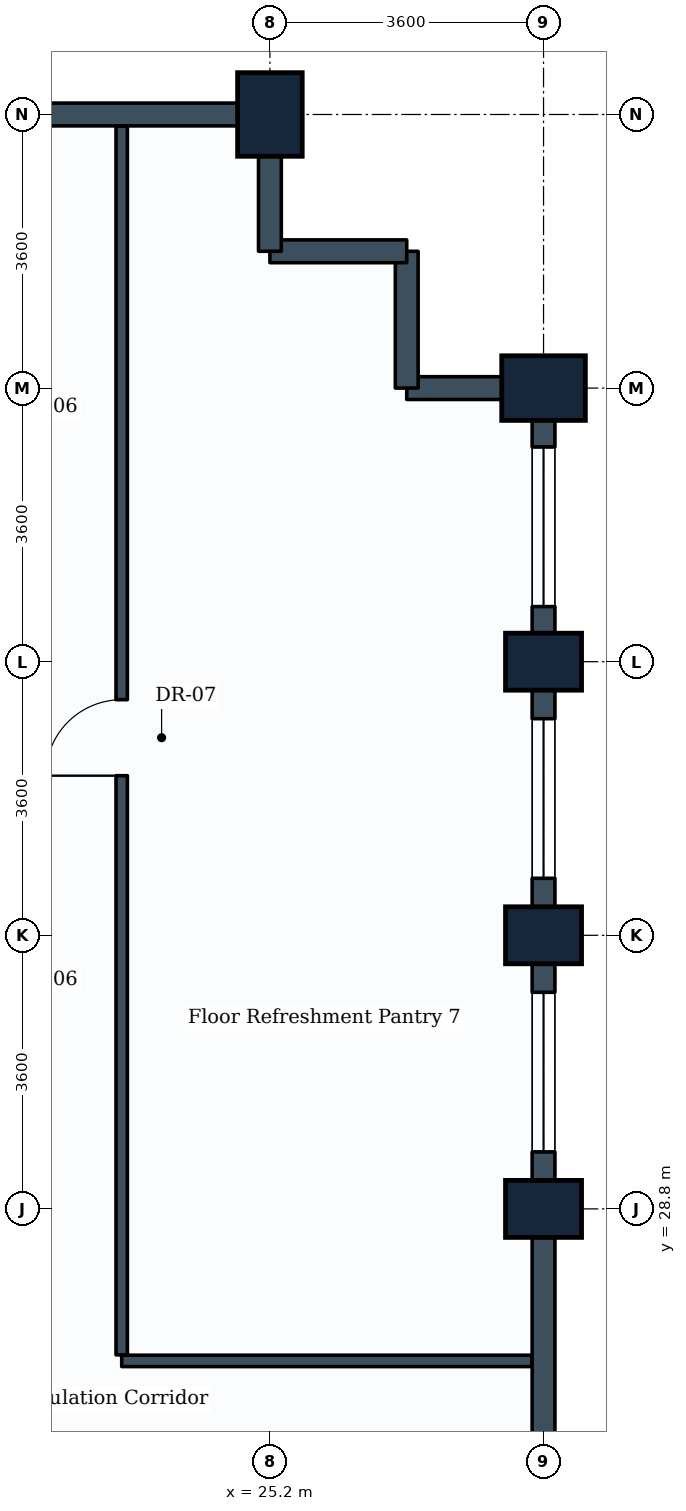
"""IFC4 building model, lengths in metres.
Left out: names, types, materials, properties, quantities, classifications, styles, units other than length and angle.
Written with IfcOpenShell. Run it as: python <this file> out.ifc"""

import sys

from ifc_helpers import new_model, si_unit, direction, frame, frame_2d, origin, origin_2d, place, context, subcontext, project, spatial, rectangle, extrude, element, fill, save


model = new_model("IFC4")
c1 = context("Model", 3, precision=1e-05, world=origin(), true_north=direction((0.0, 1.0)))
c2 = subcontext(c1, "Body", "Model", "MODEL_VIEW")
j1 = project(units=[si_unit("LENGTHUNIT", "METRE"), si_unit("PLANEANGLEUNIT", "RADIAN")], contexts=[c1])
p1 = place(None, origin())
s1 = spatial("IfcSite", under=j1, at=p1, CompositionType="ELEMENT")
p2 = place(p1, origin())
s2 = spatial("IfcBuilding", under=s1, at=p2, CompositionType="ELEMENT")
p3 = place(p2, frame((0.0, 0.0, 139.0)))
s3 = spatial("IfcBuildingStorey", under=s2, at=p3, CompositionType="ELEMENT", Elevation=139.0)
p4 = place(p3, frame((25.2, 43.2, 0.0), z_axis=(0.0, 0.0, 1.0), x_axis=(1.0, 0.0, 0.0)))
e1 = element("IfcColumn", 1, at=p4, inside=s3, PredefinedType="COLUMN", context=c2, shape_type="SweptSolid", body=[
    extrude(rectangle(XDim=0.85, YDim=1.1, at=origin_2d()), origin(), (0.0, 0.0, 1.0), 3.8),
])
for number, where, z_axis, x_axis in (
    (2, (28.8, 28.8, 0.0), (0.0, 0.0, 1.0), (0.0, 1.0, 0.0)),
    (3, (28.8, 32.4, 0.0), (0.0, 0.0, 1.0), (0.0, 1.0, 0.0)),
    (4, (28.8, 36.0, 0.0), (0.0, 0.0, 1.0), (0.0, 1.0, 0.0)),
):
    element("IfcColumn", number, at=place(p3, frame(where, z_axis=z_axis, x_axis=x_axis)), inside=s3, PredefinedType="COLUMN", context=c2, shape_type="SweptSolid", body=[
        extrude(rectangle(XDim=0.75, YDim=1.0, at=origin_2d()), origin(), (0.0, 0.0, 1.0), 3.8),
    ])
p5 = place(p3, frame((28.8, 39.6, 0.0), z_axis=(0.0, 0.0, 1.0), x_axis=(0.0, 1.0, 0.0)))
e5 = element("IfcColumn", 5, at=p5, inside=s3, PredefinedType="COLUMN", context=c2, shape_type="SweptSolid", body=[
    extrude(rectangle(XDim=0.85, YDim=1.1, at=origin_2d()), origin(), (0.0, 0.0, 1.0), 3.8),
])
p6 = place(p3, frame((28.8, 28.8, 0.0), z_axis=(0.0, 0.0, 1.0), x_axis=(0.0, -1.0, 0.0)))
e6 = element("IfcWall", 6, at=p6, inside=s3, PredefinedType="STANDARD", context=c2, shape_type="SweptSolid", body=[
    extrude(rectangle(XDim=3.6, YDim=0.3, at=frame_2d((1.8, 0.0))), origin(), (0.0, 0.0, 1.0), 3.17),
])
p7 = place(p3, frame((28.8, 32.4, 0.0), z_axis=(0.0, 0.0, 1.0), x_axis=(0.0, -1.0, 0.0)))
e7 = element("IfcWall", 7, at=p7, inside=s3, PredefinedType="STANDARD", context=c2, shape_type="SweptSolid", body=[
    extrude(rectangle(XDim=3.6, YDim=0.3, at=frame_2d((1.8, 0.0))), origin(), (0.0, 0.0, 1.0), 2.93),
])
p8 = place(p7, frame((0.75, 0.0, 0.85)))
e8 = element("IfcOpeningElement", 8, at=p8, cuts=e7, PredefinedType="OPENING", context=c2, shape_type="SweptSolid", body=[
    extrude(rectangle(XDim=2.1, YDim=1.35, at=frame_2d((1.05, 0.675))), frame((0.0, 0.16, 0.0), z_axis=(0.0, -1.0, 0.0), x_axis=(1.0, 0.0, 0.0)), (0.0, 0.0, 1.0), 0.32),
])
p9 = place(p3, frame((28.8, 36.0, 0.0), z_axis=(0.0, 0.0, 1.0), x_axis=(0.0, -1.0, 0.0)))
e9 = element("IfcWall", 9, at=p9, inside=s3, PredefinedType="STANDARD", context=c2, shape_type="SweptSolid", body=[
    extrude(rectangle(XDim=3.6, YDim=0.3, at=frame_2d((1.8, 0.0))), origin(), (0.0, 0.0, 1.0), 2.93),
])
p10 = place(p9, frame((0.75, 0.0, 0.85)))
e10 = element("IfcOpeningElement", 10, at=p10, cuts=e9, PredefinedType="OPENING", context=c2, shape_type="SweptSolid", body=[
    extrude(rectangle(XDim=2.1, YDim=1.35, at=frame_2d((1.05, 0.675))), frame((0.0, 0.16, 0.0), z_axis=(0.0, -1.0, 0.0), x_axis=(1.0, 0.0, 0.0)), (0.0, 0.0, 1.0), 0.32),
])
p11 = place(p3, frame((28.8, 39.6, 0.0), z_axis=(0.0, 0.0, 1.0), x_axis=(0.0, -1.0, 0.0)))
e11 = element("IfcWall", 11, at=p11, inside=s3, PredefinedType="STANDARD", context=c2, shape_type="SweptSolid", body=[
    extrude(rectangle(XDim=3.6, YDim=0.3, at=frame_2d((1.8, 0.0))), origin(), (0.0, 0.0, 1.0), 2.93),
])
p12 = place(p11, frame((0.775, 0.0, 0.85)))
e12 = element("IfcOpeningElement", 12, at=p12, cuts=e11, PredefinedType="OPENING", context=c2, shape_type="SweptSolid", body=[
    extrude(rectangle(XDim=2.1, YDim=1.35, at=frame_2d((1.05, 0.675))), frame((0.0, 0.16, 0.0), z_axis=(0.0, -1.0, 0.0), x_axis=(1.0, 0.0, 0.0)), (0.0, 0.0, 1.0), 0.32),
])
p13 = place(p3, frame((27.0, 39.6, 0.0), z_axis=(0.0, 0.0, 1.0), x_axis=(1.0, 0.0, 0.0)))
e13 = element("IfcWall", 13, at=p13, inside=s3, PredefinedType="STANDARD", context=c2, shape_type="SweptSolid", body=[
    extrude(rectangle(XDim=1.8, YDim=0.3, at=frame_2d((0.9, 0.0))), origin(), (0.0, 0.0, 1.0), 2.93),
])
p14 = place(p3, frame((27.0, 39.6, 0.0), z_axis=(0.0, 0.0, 1.0), x_axis=(0.0, 1.0, 0.0)))
e14 = element("IfcWall", 14, at=p14, inside=s3, PredefinedType="STANDARD", context=c2, shape_type="SweptSolid", body=[
    extrude(rectangle(XDim=1.8, YDim=0.3, at=frame_2d((0.9, 0.0))), origin(), (0.0, 0.0, 1.0), 3.535),
])
p15 = place(p3, frame((25.2, 41.4, 0.0), z_axis=(0.0, 0.0, 1.0), x_axis=(1.0, 0.0, 0.0)))
e15 = element("IfcWall", 15, at=p15, inside=s3, PredefinedType="STANDARD", context=c2, shape_type="SweptSolid", body=[
    extrude(rectangle(XDim=1.8, YDim=0.3, at=frame_2d((0.9, 0.0))), origin(), (0.0, 0.0, 1.0), 3.535),
])
p16 = place(p3, frame((25.2, 41.4, 0.0), z_axis=(0.0, 0.0, 1.0), x_axis=(0.0, 1.0, 0.0)))
e16 = element("IfcWall", 16, at=p16, inside=s3, PredefinedType="STANDARD", context=c2, shape_type="SweptSolid", body=[
    extrude(rectangle(XDim=1.8, YDim=0.3, at=frame_2d((0.9, 0.0))), origin(), (0.0, 0.0, 1.0), 2.93),
])
p17 = place(p3, frame((21.6, 43.2, 0.0), z_axis=(0.0, 0.0, 1.0), x_axis=(1.0, 0.0, 0.0)))
e17 = element("IfcWall", 17, at=p17, inside=s3, PredefinedType="STANDARD", context=c2, shape_type="SweptSolid", body=[
    extrude(rectangle(XDim=3.6, YDim=0.3, at=frame_2d((1.8, 0.0))), origin(), (0.0, 0.0, 1.0), 2.93),
])
p18 = place(p3, frame((23.25, 26.8, 0.0), z_axis=(0.0, 0.0, 1.0), x_axis=(1.0, 0.0, 0.0)))
e18 = element("IfcWall", 18, at=p18, inside=s3, PredefinedType="PARTITIONING", context=c2, shape_type="SweptSolid", body=[
    extrude(rectangle(XDim=5.396, YDim=0.15, at=frame_2d((2.698, 0.0))), origin(), (0.0, 0.0, 1.0), 3.535),
])
p19 = place(p3, frame((23.25, 26.879, 0.0), z_axis=(0.0, 0.0, 1.0), x_axis=(0.0, 1.0, 0.0)))
e19 = element("IfcWall", 19, at=p19, inside=s3, PredefinedType="PARTITIONING", context=c2, shape_type="SweptSolid", body=[
    extrude(rectangle(XDim=16.167, YDim=0.15, at=frame_2d((8.083, 0.0))), origin(), (0.0, 0.0, 1.0), 2.93),
])
p20 = place(p19, frame((7.621, 0.0, 0.0)))
e20 = element("IfcOpeningElement", 20, at=p20, cuts=e19, PredefinedType="OPENING", context=c2, shape_type="SweptSolid", body=[
    extrude(rectangle(XDim=1.0, YDim=2.1, at=frame_2d((0.5, 1.05))), frame((0.0, 0.085, 0.0), z_axis=(0.0, -1.0, 0.0), x_axis=(1.0, 0.0, 0.0)), (0.0, 0.0, 1.0), 0.17),
])
p21 = place(p8, origin())
e21 = element("IfcWindow", 21, at=p21, inside=s3, PartitioningType="SINGLE_PANEL", PredefinedType="WINDOW", context=c2, shape_type="SweptSolid", body=[
    extrude(rectangle(XDim=2.1, YDim=1.35, at=frame_2d((1.05, 0.675))), frame((0.0, 0.03, 0.0), z_axis=(0.0, -1.0, 0.0), x_axis=(1.0, 0.0, 0.0)), (0.0, 0.0, 1.0), 0.06),
])
fill(e8, e21)
p22 = place(p10, origin())
e22 = element("IfcWindow", 22, at=p22, inside=s3, PartitioningType="SINGLE_PANEL", PredefinedType="WINDOW", context=c2, shape_type="SweptSolid", body=[
    extrude(rectangle(XDim=2.1, YDim=1.35, at=frame_2d((1.05, 0.675))), frame((0.0, 0.03, 0.0), z_axis=(0.0, -1.0, 0.0), x_axis=(1.0, 0.0, 0.0)), (0.0, 0.0, 1.0), 0.06),
])
fill(e10, e22)
p23 = place(p12, origin())
e23 = element("IfcWindow", 23, at=p23, inside=s3, PartitioningType="SINGLE_PANEL", PredefinedType="WINDOW", context=c2, shape_type="SweptSolid", body=[
    extrude(rectangle(XDim=2.1, YDim=1.35, at=frame_2d((1.05, 0.675))), frame((0.0, 0.03, 0.0), z_axis=(0.0, -1.0, 0.0), x_axis=(1.0, 0.0, 0.0)), (0.0, 0.0, 1.0), 0.06),
])
fill(e12, e23)
p24 = place(p20, origin())
e24 = element("IfcDoor", 24, at=p24, inside=s3, OperationType="SINGLE_SWING_LEFT", PredefinedType="DOOR", context=c2, shape_type="SweptSolid", body=[
    extrude(rectangle(XDim=1.0, YDim=2.1, at=frame_2d((0.5, 1.05))), frame((0.0, 0.025, 0.0), z_axis=(0.0, -1.0, 0.0), x_axis=(1.0, 0.0, 0.0)), (0.0, 0.0, 1.0), 0.05),
])
fill(e20, e24)
save(model, sys.argv[1])
